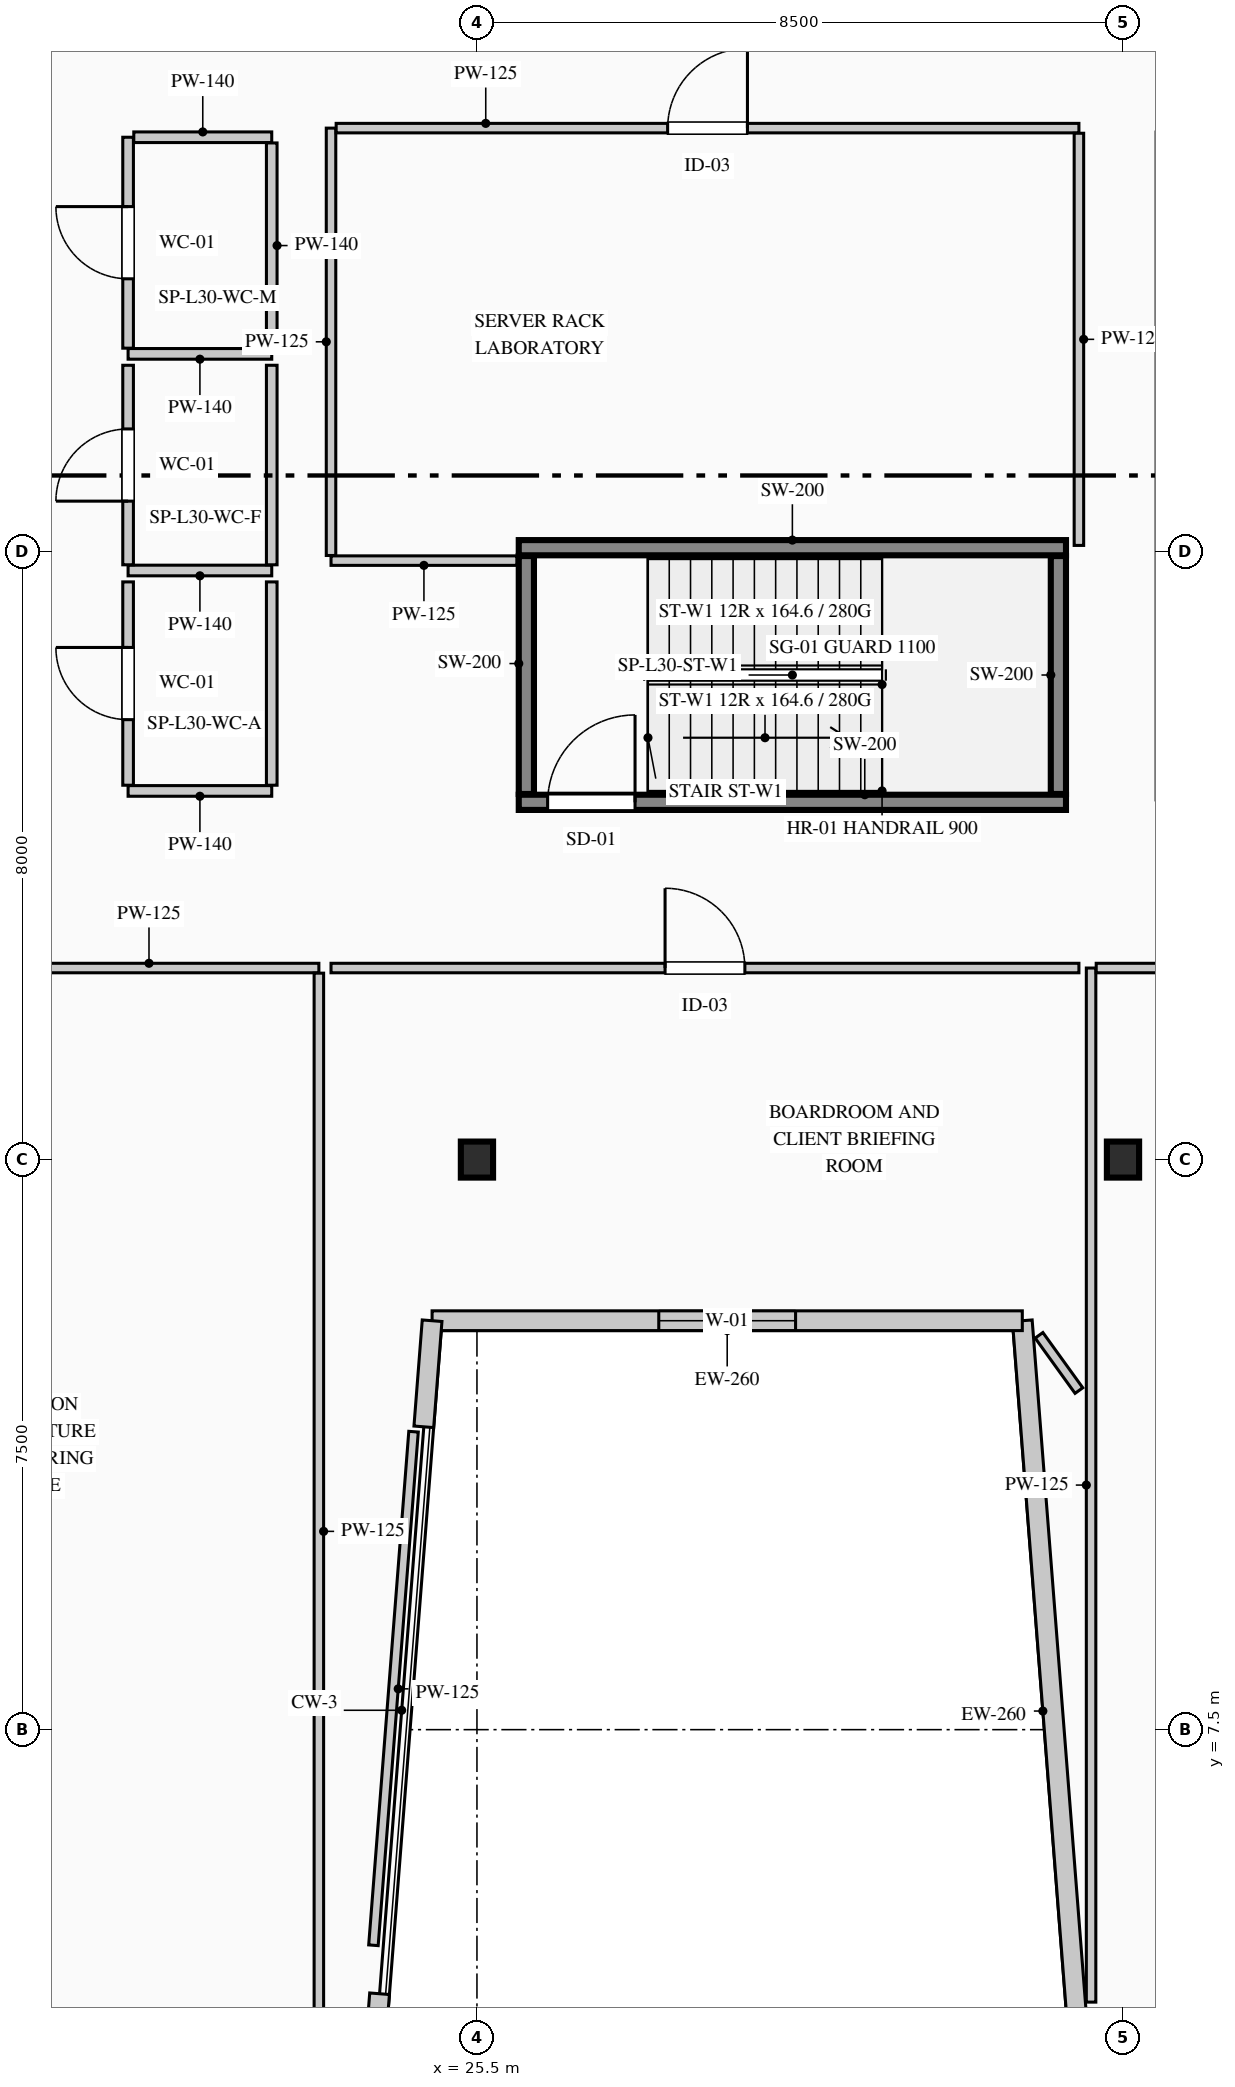
"""IFC4 building model, lengths in metres.
Left out: names, types, materials, properties, quantities, classifications, styles, units other than length and angle.
Written with IfcOpenShell. Run it as: python <this file> out.ifc"""

import sys

from ifc_helpers import new_model, si_unit, direction, frame, frame_2d, origin, origin_2d, place, context, subcontext, project, spatial, rectangle, i_section, extrude, element, fill, save


model = new_model("IFC4")
c1 = context("Model", 3, precision=1e-05, world=origin(), true_north=direction((0.0, 1.0)))
c2 = subcontext(c1, "Body", "Model", "MODEL_VIEW")
j1 = project(units=[si_unit("LENGTHUNIT", "METRE"), si_unit("PLANEANGLEUNIT", "RADIAN")], contexts=[c1])
p1 = place(None, origin())
s1 = spatial("IfcSite", under=j1, at=p1, CompositionType="ELEMENT")
p2 = place(p1, origin())
s2 = spatial("IfcBuilding", under=s1, at=p2, CompositionType="ELEMENT")
p3 = place(p2, frame((0.0, 0.0, 131.15)))
s3 = spatial("IfcBuildingStorey", under=s2, at=p3, CompositionType="ELEMENT", Elevation=131.15)
p4 = place(p3, frame((26.05, 19.7, 0.0), z_axis=(0.0, 0.0, 1.0), x_axis=(1.0, 0.0, 0.0)))
e1 = element("IfcWall", 1, at=p4, inside=s3, PredefinedType="SHEAR", context=c2, shape_type="SweptSolid", body=[
    extrude(rectangle(XDim=7.2, YDim=0.2, at=frame_2d((3.6, 0.0))), origin(), (0.0, 0.0, 1.0), 3.95),
])
p5 = place(p4, frame((0.38, 0.0, 0.0)))
e2 = element("IfcOpeningElement", 2, at=p5, cuts=e1, PredefinedType="OPENING", context=c2, shape_type="SweptSolid", body=[
    extrude(rectangle(XDim=1.15, YDim=2.2, at=frame_2d((0.575, 1.1))), frame((0.0, 0.11, 0.0), z_axis=(0.0, -1.0, 0.0), x_axis=(1.0, 0.0, 0.0)), (0.0, 0.0, 1.0), 0.22),
])
p6 = place(p3, frame((26.05, 23.05, 0.0), z_axis=(0.0, 0.0, 1.0), x_axis=(1.0, 0.0, 0.0)))
e3 = element("IfcWall", 3, at=p6, inside=s3, PredefinedType="SHEAR", context=c2, shape_type="SweptSolid", body=[
    extrude(rectangle(XDim=7.2, YDim=0.2, at=frame_2d((3.6, 0.0))), origin(), (0.0, 0.0, 1.0), 3.95),
])
for number, where, z_axis, x_axis in (
    (4, (26.15, 19.81, 0.0), (0.0, 0.0, 1.0), (0.0, 1.0, 0.0)),
    (5, (33.15, 19.81, 0.0), (0.0, 0.0, 1.0), (0.0, 1.0, 0.0)),
):
    element("IfcWall", number, at=place(p3, frame(where, z_axis=z_axis, x_axis=x_axis)), inside=s3, PredefinedType="SHEAR", context=c2, shape_type="SweptSolid", body=[
        extrude(rectangle(XDim=3.13, YDim=0.2, at=frame_2d((1.565, 0.0))), origin(), (0.0, 0.0, 1.0), 3.95),
    ])
for number, where, z_axis, x_axis in (
    (6, (25.5, 15.0, 0.0), (0.0, 0.0, 1.0), (1.0, 0.0, 0.0)),
    (7, (34.0, 15.0, 0.0), (0.0, 0.0, 1.0), (1.0, 0.0, 0.0)),
):
    element("IfcColumn", number, at=place(p3, frame(where, z_axis=z_axis, x_axis=x_axis)), inside=s3, PredefinedType="COLUMN", context=c2, shape_type="SweptSolid", body=[
        extrude(i_section(OverallWidth=0.424, OverallDepth=0.474, WebThickness=0.048, FlangeThickness=0.077, FilletRadius=0.015, at=origin_2d()), origin(), (0.0, 0.0, 1.0), 3.95),
    ])
p7 = place(p3, frame((33.475, 2.63, 0.0), z_axis=(0.0, 0.0, 1.0), x_axis=(-0.077793257511, 0.996969512616, 0.0)))
e8 = element("IfcWall", 8, at=p7, inside=s3, PredefinedType="STANDARD", context=c2, shape_type="SweptSolid", body=[
    extrude(rectangle(XDim=10.281, YDim=0.26, at=frame_2d((5.141, 0.0))), origin(), (0.0, 0.0, 1.0), 3.69),
])
p8 = place(p3, frame((32.675, 12.88, 0.0), z_axis=(0.0, 0.0, 1.0), x_axis=(-1.0, 0.0, 0.0)))
e9 = element("IfcWall", 9, at=p8, inside=s3, PredefinedType="STANDARD", context=c2, shape_type="SweptSolid", body=[
    extrude(rectangle(XDim=7.765, YDim=0.26, at=frame_2d((3.883, 0.0))), origin(), (0.0, 0.0, 1.0), 3.69),
])
p9 = place(p8, frame((2.983, 0.0, 0.9)))
e10 = element("IfcOpeningElement", 10, at=p9, cuts=e9, PredefinedType="OPENING", context=c2, shape_type="SweptSolid", body=[
    extrude(rectangle(XDim=1.8, YDim=2.1, at=frame_2d((0.9, 1.05))), frame((0.0, 0.14, 0.0), z_axis=(0.0, -1.0, 0.0), x_axis=(1.0, 0.0, 0.0)), (0.0, 0.0, 1.0), 0.28),
])
for number, where, z_axis, x_axis in (
    (11, (24.91, 12.88, 0.0), (0.0, 0.0, 1.0), (-0.078, -0.997, 0.0)),
    (12, (24.219, 4.026, 0.0), (0.0, 0.0, 1.0), (-0.078, -0.997, 0.0)),
):
    element("IfcWall", number, at=place(p3, frame(where, z_axis=z_axis, x_axis=x_axis)), inside=s3, PredefinedType="STANDARD", context=c2, shape_type="SweptSolid", body=[
        extrude(rectangle(XDim=1.4, YDim=0.26, at=frame_2d((0.7, 0.0))), origin(), (0.0, 0.0, 1.0), 3.69),
    ])
p10 = place(p3, frame((22.8, 25.6, 0.0), z_axis=(0.0, 0.0, 1.0), x_axis=(-1.0, 0.0, 0.0)))
e13 = element("IfcWall", 13, at=p10, inside=s3, PredefinedType="PARTITIONING", context=c2, shape_type="SweptSolid", body=[
    extrude(rectangle(XDim=1.89, YDim=0.14, at=frame_2d((0.945, 0.0))), origin(), (0.0, 0.0, 1.0), 3.69),
])
p11 = place(p3, frame((20.91, 25.675, 0.0), z_axis=(0.0, 0.0, 1.0), x_axis=(0.0, 1.0, 0.0)))
e14 = element("IfcWall", 14, at=p11, inside=s3, PredefinedType="PARTITIONING", context=c2, shape_type="SweptSolid", body=[
    extrude(rectangle(XDim=2.775, YDim=0.14, at=frame_2d((1.387, 0.0))), origin(), (0.0, 0.0, 1.0), 3.69),
])
p12 = place(p11, frame((0.913, 0.0, 0.0)))
e15 = element("IfcOpeningElement", 15, at=p12, cuts=e14, PredefinedType="OPENING", context=c2, shape_type="SweptSolid", body=[
    extrude(rectangle(XDim=0.95, YDim=2.15, at=frame_2d((0.475, 1.075))), frame((0.0, 0.08, 0.0), z_axis=(0.0, -1.0, 0.0), x_axis=(1.0, 0.0, 0.0)), (0.0, 0.0, 1.0), 0.16),
])
p13 = place(p3, frame((20.985, 28.45, 0.0), z_axis=(0.0, 0.0, 1.0), x_axis=(1.0, 0.0, 0.0)))
e16 = element("IfcWall", 16, at=p13, inside=s3, PredefinedType="PARTITIONING", context=c2, shape_type="SweptSolid", body=[
    extrude(rectangle(XDim=1.815, YDim=0.14, at=frame_2d((0.907, 0.0))), origin(), (0.0, 0.0, 1.0), 3.69),
])
p14 = place(p3, frame((22.8, 28.375, 0.0), z_axis=(0.0, 0.0, 1.0), x_axis=(0.0, -1.0, 0.0)))
e17 = element("IfcWall", 17, at=p14, inside=s3, PredefinedType="PARTITIONING", context=c2, shape_type="SweptSolid", body=[
    extrude(rectangle(XDim=2.7, YDim=0.14, at=frame_2d((1.35, 0.0))), origin(), (0.0, 0.0, 1.0), 3.375),
])
p15 = place(p3, frame((22.8, 22.75, 0.0), z_axis=(0.0, 0.0, 1.0), x_axis=(-1.0, 0.0, 0.0)))
e18 = element("IfcWall", 18, at=p15, inside=s3, PredefinedType="PARTITIONING", context=c2, shape_type="SweptSolid", body=[
    extrude(rectangle(XDim=1.89, YDim=0.14, at=frame_2d((0.945, 0.0))), origin(), (0.0, 0.0, 1.0), 3.69),
])
p16 = place(p3, frame((20.91, 22.825, 0.0), z_axis=(0.0, 0.0, 1.0), x_axis=(0.0, 1.0, 0.0)))
e19 = element("IfcWall", 19, at=p16, inside=s3, PredefinedType="PARTITIONING", context=c2, shape_type="SweptSolid", body=[
    extrude(rectangle(XDim=2.625, YDim=0.14, at=frame_2d((1.312, 0.0))), origin(), (0.0, 0.0, 1.0), 3.69),
])
p17 = place(p16, frame((0.837, 0.0, 0.0)))
e20 = element("IfcOpeningElement", 20, at=p17, cuts=e19, PredefinedType="OPENING", context=c2, shape_type="SweptSolid", body=[
    extrude(rectangle(XDim=0.95, YDim=2.15, at=frame_2d((0.475, 1.075))), frame((0.0, 0.08, 0.0), z_axis=(0.0, -1.0, 0.0), x_axis=(1.0, 0.0, 0.0)), (0.0, 0.0, 1.0), 0.16),
])
p18 = place(p3, frame((22.8, 25.45, 0.0), z_axis=(0.0, 0.0, 1.0), x_axis=(0.0, -1.0, 0.0)))
e21 = element("IfcWall", 21, at=p18, inside=s3, PredefinedType="PARTITIONING", context=c2, shape_type="SweptSolid", body=[
    extrude(rectangle(XDim=2.625, YDim=0.14, at=frame_2d((1.312, 0.0))), origin(), (0.0, 0.0, 1.0), 3.375),
])
p19 = place(p3, frame((22.8, 19.85, 0.0), z_axis=(0.0, 0.0, 1.0), x_axis=(-1.0, 0.0, 0.0)))
e22 = element("IfcWall", 22, at=p19, inside=s3, PredefinedType="PARTITIONING", context=c2, shape_type="SweptSolid", body=[
    extrude(rectangle(XDim=1.89, YDim=0.14, at=frame_2d((0.945, 0.0))), origin(), (0.0, 0.0, 1.0), 3.69),
])
p20 = place(p3, frame((20.91, 19.925, 0.0), z_axis=(0.0, 0.0, 1.0), x_axis=(0.0, 1.0, 0.0)))
e23 = element("IfcWall", 23, at=p20, inside=s3, PredefinedType="PARTITIONING", context=c2, shape_type="SweptSolid", body=[
    extrude(rectangle(XDim=2.675, YDim=0.14, at=frame_2d((1.337, 0.0))), origin(), (0.0, 0.0, 1.0), 3.69),
])
p21 = place(p20, frame((0.863, 0.0, 0.0)))
e24 = element("IfcOpeningElement", 24, at=p21, cuts=e23, PredefinedType="OPENING", context=c2, shape_type="SweptSolid", body=[
    extrude(rectangle(XDim=0.95, YDim=2.15, at=frame_2d((0.475, 1.075))), frame((0.0, 0.08, 0.0), z_axis=(0.0, -1.0, 0.0), x_axis=(1.0, 0.0, 0.0)), (0.0, 0.0, 1.0), 0.16),
])
p22 = place(p3, frame((22.8, 22.6, 0.0), z_axis=(0.0, 0.0, 1.0), x_axis=(0.0, -1.0, 0.0)))
e25 = element("IfcWall", 25, at=p22, inside=s3, PredefinedType="PARTITIONING", context=c2, shape_type="SweptSolid", body=[
    extrude(rectangle(XDim=2.675, YDim=0.14, at=frame_2d((1.337, 0.0))), origin(), (0.0, 0.0, 1.0), 3.375),
])
p23 = place(p3, frame((12.58, 17.52, 0.0), z_axis=(0.0, 0.0, 1.0), x_axis=(1.0, 0.0, 0.0)))
e26 = element("IfcWall", 26, at=p23, inside=s3, PredefinedType="PARTITIONING", context=c2, shape_type="SweptSolid", body=[
    extrude(rectangle(XDim=10.84, YDim=0.125, at=frame_2d((5.42, 0.0))), origin(), (0.0, 0.0, 1.0), 3.69),
])
p24 = place(p23, frame((4.895, 0.0, 0.0)))
e27 = element("IfcOpeningElement", 27, at=p24, cuts=e26, PredefinedType="OPENING", context=c2, shape_type="SweptSolid", body=[
    extrude(rectangle(XDim=1.05, YDim=2.15, at=frame_2d((0.525, 1.075))), frame((0.0, 0.073, 0.0), z_axis=(0.0, -1.0, 0.0), x_axis=(1.0, 0.0, 0.0)), (0.0, 0.0, 1.0), 0.145),
])
p25 = place(p3, frame((23.42, 17.452, 0.0), z_axis=(0.0, 0.0, 1.0), x_axis=(0.0, -1.0, 0.0)))
e28 = element("IfcWall", 28, at=p25, inside=s3, PredefinedType="PARTITIONING", context=c2, shape_type="SweptSolid", body=[
    extrude(rectangle(XDim=14.688, YDim=0.125, at=frame_2d((7.344, 0.0))), origin(), (0.0, 0.0, 1.0), 3.69),
])
p26 = place(p3, frame((33.58, 3.915, 0.0), z_axis=(0.0, 0.0, 1.0), x_axis=(0.0, 1.0, 0.0)))
e29 = element("IfcWall", 29, at=p26, inside=s3, PredefinedType="PARTITIONING", context=c2, shape_type="SweptSolid", body=[
    extrude(rectangle(XDim=13.605, YDim=0.125, at=frame_2d((6.802, 0.0))), origin(), (0.0, 0.0, 1.0), 3.69),
])
p27 = place(p3, frame((33.647, 17.52, 0.0), z_axis=(0.0, 0.0, 1.0), x_axis=(1.0, 0.0, 0.0)))
e30 = element("IfcWall", 30, at=p27, inside=s3, PredefinedType="PARTITIONING", context=c2, shape_type="SweptSolid", body=[
    extrude(rectangle(XDim=8.772, YDim=0.125, at=frame_2d((4.386, 0.0))), origin(), (0.0, 0.0, 1.0), 3.375),
])
p28 = place(p27, frame((3.861, 0.0, 0.0)))
e31 = element("IfcOpeningElement", 31, at=p28, cuts=e30, PredefinedType="OPENING", context=c2, shape_type="SweptSolid", body=[
    extrude(rectangle(XDim=1.05, YDim=2.15, at=frame_2d((0.525, 1.075))), frame((0.0, 0.073, 0.0), z_axis=(0.0, -1.0, 0.0), x_axis=(1.0, 0.0, 0.0)), (0.0, 0.0, 1.0), 0.145),
])
p29 = place(p3, frame((33.42, 11.961, 0.0), z_axis=(0.0, 0.0, 1.0), x_axis=(-0.58517236533, 0.810908936228, 0.0)))
e32 = element("IfcWall", 32, at=p29, inside=s3, PredefinedType="PARTITIONING", context=c2, shape_type="SweptSolid", body=[
    extrude(rectangle(XDim=0.896, YDim=0.125, at=frame_2d((0.448, 0.0))), origin(), (0.0, 0.0, 1.0), 3.69),
])
p30 = place(p3, frame((24.666, 11.42, 0.0), z_axis=(0.0, 0.0, 1.0), x_axis=(-0.077847945506, -0.996965243818, 0.0)))
e33 = element("IfcWall", 33, at=p30, inside=s3, PredefinedType="PARTITIONING", context=c2, shape_type="SweptSolid", body=[
    extrude(rectangle(XDim=6.777, YDim=0.125, at=frame_2d((3.389, 0.0))), origin(), (0.0, 0.0, 1.0), 3.69),
])
p31 = place(p3, frame((23.58, 17.52, 0.0), z_axis=(0.0, 0.0, 1.0), x_axis=(1.0, 0.0, 0.0)))
e34 = element("IfcWall", 34, at=p31, inside=s3, PredefinedType="PARTITIONING", context=c2, shape_type="SweptSolid", body=[
    extrude(rectangle(XDim=9.84, YDim=0.125, at=frame_2d((4.92, 0.0))), origin(), (0.0, 0.0, 1.0), 3.375),
])
p32 = place(p31, frame((4.395, 0.0, 0.0)))
e35 = element("IfcOpeningElement", 35, at=p32, cuts=e34, PredefinedType="OPENING", context=c2, shape_type="SweptSolid", body=[
    extrude(rectangle(XDim=1.05, YDim=2.15, at=frame_2d((0.525, 1.075))), frame((0.0, 0.073, 0.0), z_axis=(0.0, -1.0, 0.0), x_axis=(1.0, 0.0, 0.0)), (0.0, 0.0, 1.0), 0.145),
])
p33 = place(p3, frame((26.025, 22.88, 0.0), z_axis=(0.0, 0.0, 1.0), x_axis=(-1.0, 0.0, 0.0)))
e36 = element("IfcWall", 36, at=p33, inside=s3, PredefinedType="PARTITIONING", context=c2, shape_type="SweptSolid", body=[
    extrude(rectangle(XDim=2.445, YDim=0.125, at=frame_2d((1.222, 0.0))), origin(), (0.0, 0.0, 1.0), 3.69),
])
p34 = place(p3, frame((23.58, 22.948, 0.0), z_axis=(0.0, 0.0, 1.0), x_axis=(0.0, 1.0, 0.0)))
e37 = element("IfcWall", 37, at=p34, inside=s3, PredefinedType="PARTITIONING", context=c2, shape_type="SweptSolid", body=[
    extrude(rectangle(XDim=5.623, YDim=0.125, at=frame_2d((2.811, 0.0))), origin(), (0.0, 0.0, 1.0), 3.69),
])
p35 = place(p3, frame((23.647, 28.57, 0.0), z_axis=(0.0, 0.0, 1.0), x_axis=(1.0, 0.0, 0.0)))
e38 = element("IfcWall", 38, at=p35, inside=s3, PredefinedType="PARTITIONING", context=c2, shape_type="SweptSolid", body=[
    extrude(rectangle(XDim=9.772, YDim=0.125, at=frame_2d((4.886, 0.0))), origin(), (0.0, 0.0, 1.0), 3.375),
])
p36 = place(p35, frame((4.361, 0.0, 0.0)))
e39 = element("IfcOpeningElement", 39, at=p36, cuts=e38, PredefinedType="OPENING", context=c2, shape_type="SweptSolid", body=[
    extrude(rectangle(XDim=1.05, YDim=2.15, at=frame_2d((0.525, 1.075))), frame((0.0, 0.073, 0.0), z_axis=(0.0, -1.0, 0.0), x_axis=(1.0, 0.0, 0.0)), (0.0, 0.0, 1.0), 0.145),
])
p37 = place(p3, frame((33.42, 28.502, 0.0), z_axis=(0.0, 0.0, 1.0), x_axis=(0.0, -1.0, 0.0)))
e40 = element("IfcWall", 40, at=p37, inside=s3, PredefinedType="PARTITIONING", context=c2, shape_type="SweptSolid", body=[
    extrude(rectangle(XDim=5.422, YDim=0.125, at=frame_2d((2.711, 0.0))), origin(), (0.0, 0.0, 1.0), 3.69),
])
p38 = place(p9, origin())
e41 = element("IfcWindow", 41, at=p38, inside=s3, PartitioningType="SINGLE_PANEL", PredefinedType="WINDOW", context=c2, shape_type="SweptSolid", body=[
    extrude(rectangle(XDim=1.8, YDim=2.1, at=frame_2d((0.9, 1.05))), frame((0.0, 0.03, 0.0), z_axis=(0.0, -1.0, 0.0), x_axis=(1.0, 0.0, 0.0)), (0.0, 0.0, 1.0), 0.06),
])
fill(e10, e41)
p39 = place(p5, origin())
e42 = element("IfcDoor", 42, at=p39, inside=s3, OperationType="SINGLE_SWING_RIGHT", PredefinedType="DOOR", context=c2, shape_type="SweptSolid", body=[
    extrude(rectangle(XDim=1.15, YDim=2.2, at=frame_2d((0.575, 1.1))), frame((0.0, 0.025, 0.0), z_axis=(0.0, -1.0, 0.0), x_axis=(1.0, 0.0, 0.0)), (0.0, 0.0, 1.0), 0.05),
])
fill(e2, e42)
p40 = place(p12, origin())
e43 = element("IfcDoor", 43, at=p40, inside=s3, OperationType="SINGLE_SWING_RIGHT", PredefinedType="DOOR", context=c2, shape_type="SweptSolid", body=[
    extrude(rectangle(XDim=0.95, YDim=2.15, at=frame_2d((0.475, 1.075))), frame((0.0, 0.025, 0.0), z_axis=(0.0, -1.0, 0.0), x_axis=(1.0, 0.0, 0.0)), (0.0, 0.0, 1.0), 0.05),
])
fill(e15, e43)
p41 = place(p17, origin())
e44 = element("IfcDoor", 44, at=p41, inside=s3, OperationType="SINGLE_SWING_LEFT", PredefinedType="DOOR", context=c2, shape_type="SweptSolid", body=[
    extrude(rectangle(XDim=0.95, YDim=2.15, at=frame_2d((0.475, 1.075))), frame((0.0, 0.025, 0.0), z_axis=(0.0, -1.0, 0.0), x_axis=(1.0, 0.0, 0.0)), (0.0, 0.0, 1.0), 0.05),
])
fill(e20, e44)
p42 = place(p21, origin())
e45 = element("IfcDoor", 45, at=p42, inside=s3, OperationType="SINGLE_SWING_RIGHT", PredefinedType="DOOR", context=c2, shape_type="SweptSolid", body=[
    extrude(rectangle(XDim=0.95, YDim=2.15, at=frame_2d((0.475, 1.075))), frame((0.0, 0.025, 0.0), z_axis=(0.0, -1.0, 0.0), x_axis=(1.0, 0.0, 0.0)), (0.0, 0.0, 1.0), 0.05),
])
fill(e24, e45)
p43 = place(p32, origin())
e46 = element("IfcDoor", 46, at=p43, inside=s3, OperationType="SINGLE_SWING_LEFT", PredefinedType="DOOR", context=c2, shape_type="SweptSolid", body=[
    extrude(rectangle(XDim=1.05, YDim=2.15, at=frame_2d((0.525, 1.075))), frame((0.0, 0.025, 0.0), z_axis=(0.0, -1.0, 0.0), x_axis=(1.0, 0.0, 0.0)), (0.0, 0.0, 1.0), 0.05),
])
fill(e35, e46)
p44 = place(p36, origin())
e47 = element("IfcDoor", 47, at=p44, inside=s3, OperationType="SINGLE_SWING_RIGHT", PredefinedType="DOOR", context=c2, shape_type="SweptSolid", body=[
    extrude(rectangle(XDim=1.05, YDim=2.15, at=frame_2d((0.525, 1.075))), frame((0.0, 0.025, 0.0), z_axis=(0.0, -1.0, 0.0), x_axis=(1.0, 0.0, 0.0)), (0.0, 0.0, 1.0), 0.05),
])
fill(e39, e47)
save(model, sys.argv[1])
